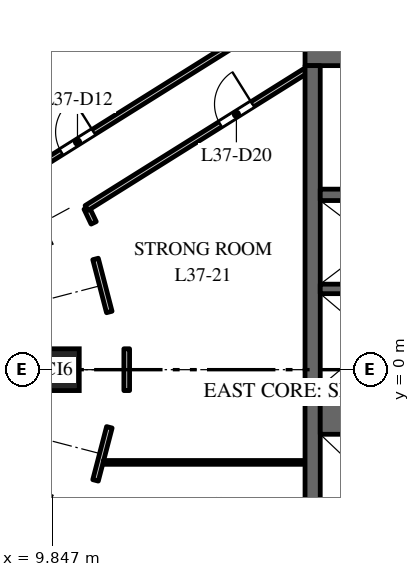
"""IFC4 building model, lengths in metres.
Left out: names, types, materials, properties, quantities, classifications, styles, units other than length and angle.
Written with IfcOpenShell. Run it as: python <this file> out.ifc"""

import sys

from ifc_helpers import new_model, si_unit, direction, frame, frame_2d, origin, origin_2d, place, context, subcontext, project, spatial, rectangle, extrude, element, fill, save


model = new_model("IFC4")
c1 = context("Model", 3, precision=1e-05, world=origin(), true_north=direction((0.0, 1.0)))
c2 = subcontext(c1, "Body", "Model", "MODEL_VIEW")
j1 = project(units=[si_unit("LENGTHUNIT", "METRE"), si_unit("PLANEANGLEUNIT", "RADIAN")], contexts=[c1])
p1 = place(None, origin())
s1 = spatial("IfcSite", under=j1, at=p1, CompositionType="ELEMENT")
p2 = place(p1, origin())
s2 = spatial("IfcBuilding", under=s1, at=p2, CompositionType="ELEMENT")
p3 = place(p2, frame((0.0, 0.0, 162.0)))
s3 = spatial("IfcBuildingStorey", under=s2, at=p3, CompositionType="ELEMENT", Elevation=162.0)
p4 = place(p3, frame((10.008, 0.0, 0.0), z_axis=(0.0, 0.0, 1.0), x_axis=(0.0, 1.0, 0.0)))
e1 = element("IfcColumn", 1, at=p4, inside=s3, PredefinedType="COLUMN", context=c2, shape_type="SweptSolid", body=[
    extrude(rectangle(XDim=1.1, YDim=1.1, at=origin_2d()), origin(), (0.0, 0.0, 1.0), 4.0),
])
p5 = place(p3, frame((16.5, 8.25, 0.0), z_axis=(0.0, 0.0, 1.0), x_axis=(1.0, 0.0, 0.0)))
e2 = element("IfcWall", 2, at=p5, inside=s3, PredefinedType="SHEAR", context=c2, shape_type="SweptSolid", body=[
    extrude(rectangle(XDim=15.0, YDim=0.5, at=frame_2d((7.5, 0.0))), origin(), (0.0, 0.0, 1.0), 3.7),
])
p6 = place(p5, frame((6.9, 0.0, 0.0)))
e3 = element("IfcOpeningElement", 3, at=p6, cuts=e2, PredefinedType="OPENING", context=c2, shape_type="SweptSolid", body=[
    extrude(rectangle(XDim=1.2, YDim=2.1, at=frame_2d((0.6, 1.05))), frame((0.0, 0.26, 0.0), z_axis=(0.0, -1.0, 0.0), x_axis=(1.0, 0.0, 0.0)), (0.0, 0.0, 1.0), 0.52),
])
p7 = place(p5, frame((12.05, 0.0, 0.0)))
e4 = element("IfcOpeningElement", 4, at=p7, cuts=e2, PredefinedType="OPENING", context=c2, shape_type="SweptSolid", body=[
    extrude(rectangle(XDim=0.9, YDim=2.1, at=frame_2d((0.45, 1.05))), frame((0.0, 0.26, 0.0), z_axis=(0.0, -1.0, 0.0), x_axis=(1.0, 0.0, 0.0)), (0.0, 0.0, 1.0), 0.52),
])
p8 = place(p3, frame((16.7, -8.0, 0.0), z_axis=(0.0, 0.0, 1.0), x_axis=(0.0, 1.0, 0.0)))
e5 = element("IfcWall", 5, at=p8, inside=s3, PredefinedType="SHEAR", context=c2, shape_type="SweptSolid", body=[
    extrude(rectangle(XDim=16.0, YDim=0.4, at=frame_2d((8.0, 0.0))), origin(), (0.0, 0.0, 1.0), 3.7),
])
p9 = place(p3, frame((16.9, -1.075, 0.0), z_axis=(0.0, 0.0, 1.0), x_axis=(1.0, 0.0, 0.0)))
e6 = element("IfcWall", 6, at=p9, inside=s3, PredefinedType="SHEAR", context=c2, shape_type="SweptSolid", body=[
    extrude(rectangle(XDim=2.9, YDim=1.25, at=frame_2d((1.45, 0.0))), origin(), (0.0, 0.0, 1.0), 3.7),
])
p10 = place(p3, frame((16.9, 2.125, 0.0), z_axis=(0.0, 0.0, 1.0), x_axis=(1.0, 0.0, 0.0)))
e7 = element("IfcWall", 7, at=p10, inside=s3, PredefinedType="SHEAR", context=c2, shape_type="SweptSolid", body=[
    extrude(rectangle(XDim=2.9, YDim=0.25, at=frame_2d((1.45, 0.0))), origin(), (0.0, 0.0, 1.0), 3.7),
])
p11 = place(p3, frame((16.9, 4.6, 0.0), z_axis=(0.0, 0.0, 1.0), x_axis=(1.0, 0.0, 0.0)))
e8 = element("IfcWall", 8, at=p11, inside=s3, PredefinedType="SHEAR", context=c2, shape_type="SweptSolid", body=[
    extrude(rectangle(XDim=6.18, YDim=0.3, at=frame_2d((3.09, 0.0))), origin(), (0.0, 0.0, 1.0), 3.7),
])
p12 = place(p11, frame((4.9, 0.0, 0.0)))
e9 = element("IfcOpeningElement", 9, at=p12, cuts=e8, PredefinedType="OPENING", context=c2, shape_type="SweptSolid", body=[
    extrude(rectangle(XDim=1.1, YDim=2.1, at=frame_2d((0.55, 1.05))), frame((0.0, 0.16, 0.0), z_axis=(0.0, -1.0, 0.0), x_axis=(1.0, 0.0, 0.0)), (0.0, 0.0, 1.0), 0.32),
])
p13 = place(p3, frame((9.679, 5.469, 0.0), z_axis=(0.0, 0.0, 1.0), x_axis=(0.847602682855, 0.530631408811, 0.0)))
e10 = element("IfcWall", 10, at=p13, inside=s3, PredefinedType="PARTITIONING", context=c2, shape_type="SweptSolid", body=[
    extrude(rectangle(XDim=6.383, YDim=0.15, at=frame_2d((3.191, 0.0))), origin(), (0.0, 0.0, 1.0), 3.7),
])
p14 = place(p13, frame((0.483, 0.0, 0.0)))
e11 = element("IfcOpeningElement", 11, at=p14, cuts=e10, PredefinedType="OPENING", context=c2, shape_type="SweptSolid", body=[
    extrude(rectangle(XDim=1.0, YDim=2.1, at=frame_2d((0.5, 1.05))), frame((0.0, 0.085, 0.0), z_axis=(0.0, -1.0, 0.0), x_axis=(1.0, 0.0, 0.0)), (0.0, 0.0, 1.0), 0.17),
])
p15 = place(p3, frame((10.752, 4.254, 0.0), z_axis=(0.0, 0.0, 1.0), x_axis=(0.429758433873, -0.90294390109, 0.0)))
e12 = element("IfcWall", 12, at=p15, inside=s3, PredefinedType="PARTITIONING", context=c2, shape_type="SweptSolid", body=[
    extrude(rectangle(XDim=0.433, YDim=0.15, at=frame_2d((0.216, 0.0))), origin(), (0.0, 0.0, 1.0), 3.7),
])
p16 = place(p3, frame((10.752, 4.254, 0.0), z_axis=(0.0, 0.0, 1.0), x_axis=(0.847690706888, 0.530490777917, 0.0)))
e13 = element("IfcWall", 13, at=p16, inside=s3, PredefinedType="PARTITIONING", context=c2, shape_type="SweptSolid", body=[
    extrude(rectangle(XDim=6.781, YDim=0.15, at=frame_2d((3.39, 0.0))), origin(), (0.0, 0.0, 1.0), 3.7),
])
p17 = place(p16, frame((4.15, 0.0, 0.0)))
e14 = element("IfcOpeningElement", 14, at=p17, cuts=e13, PredefinedType="OPENING", context=c2, shape_type="SweptSolid", body=[
    extrude(rectangle(XDim=1.0, YDim=2.1, at=frame_2d((0.5, 1.05))), frame((0.0, 0.085, 0.0), z_axis=(0.0, -1.0, 0.0), x_axis=(1.0, 0.0, 0.0)), (0.0, 0.0, 1.0), 0.17),
])
p18 = place(p3, frame((10.987, -2.913, 0.0), z_axis=(0.0, 0.0, 1.0), x_axis=(0.252153395539, 0.967687276509, 0.0)))
e15 = element("IfcWall", 15, at=p18, inside=s3, PredefinedType="PARTITIONING", context=c2, shape_type="SweptSolid", body=[
    extrude(rectangle(XDim=1.444, YDim=0.15, at=frame_2d((0.722, 0.0))), origin(), (0.0, 0.0, 1.0), 3.7),
])
p19 = place(p3, frame((10.987, 2.913, 0.0), z_axis=(0.0, 0.0, 1.0), x_axis=(0.251214938505, -0.967931327457, 0.0)))
e16 = element("IfcWall", 16, at=p19, inside=s3, PredefinedType="PARTITIONING", context=c2, shape_type="SweptSolid", body=[
    extrude(rectangle(XDim=1.441, YDim=0.15, at=frame_2d((0.721, 0.0))), origin(), (0.0, 0.0, 1.0), 3.7),
])
p20 = place(p3, frame((11.193, -2.44, 0.0), z_axis=(0.0, 0.0, 1.0), x_axis=(1.0, 0.0, 0.0)))
e17 = element("IfcWall", 17, at=p20, inside=s3, PredefinedType="PARTITIONING", context=c2, shape_type="SweptSolid", body=[
    extrude(rectangle(XDim=5.307, YDim=0.1, at=frame_2d((2.653, 0.0))), origin(), (0.0, 0.0, 1.0), 3.7),
])
p21 = place(p3, frame((11.808, -0.55, 0.0), z_axis=(0.0, 0.0, 1.0), x_axis=(0.0, 1.0, 0.0)))
e18 = element("IfcWall", 18, at=p21, inside=s3, PredefinedType="PARTITIONING", context=c2, shape_type="SweptSolid", body=[
    extrude(rectangle(XDim=1.1, YDim=0.15, at=frame_2d((0.55, 0.0))), origin(), (0.0, 0.0, 1.0), 3.7),
])
p22 = place(p14, origin())
e19 = element("IfcDoor", 19, at=p22, inside=s3, OperationType="SINGLE_SWING_RIGHT", PredefinedType="DOOR", context=c2, shape_type="SweptSolid", body=[
    extrude(rectangle(XDim=1.0, YDim=2.1, at=frame_2d((0.5, 1.05))), frame((0.0, 0.025, 0.0), z_axis=(0.0, -1.0, 0.0), x_axis=(1.0, 0.0, 0.0)), (0.0, 0.0, 1.0), 0.05),
])
fill(e11, e19)
p23 = place(p17, origin())
e20 = element("IfcDoor", 20, at=p23, inside=s3, OperationType="SINGLE_SWING_RIGHT", PredefinedType="DOOR", context=c2, shape_type="SweptSolid", body=[
    extrude(rectangle(XDim=1.0, YDim=2.1, at=frame_2d((0.5, 1.05))), frame((0.0, 0.025, 0.0), z_axis=(0.0, -1.0, 0.0), x_axis=(1.0, 0.0, 0.0)), (0.0, 0.0, 1.0), 0.05),
])
fill(e14, e20)
save(model, sys.argv[1])
